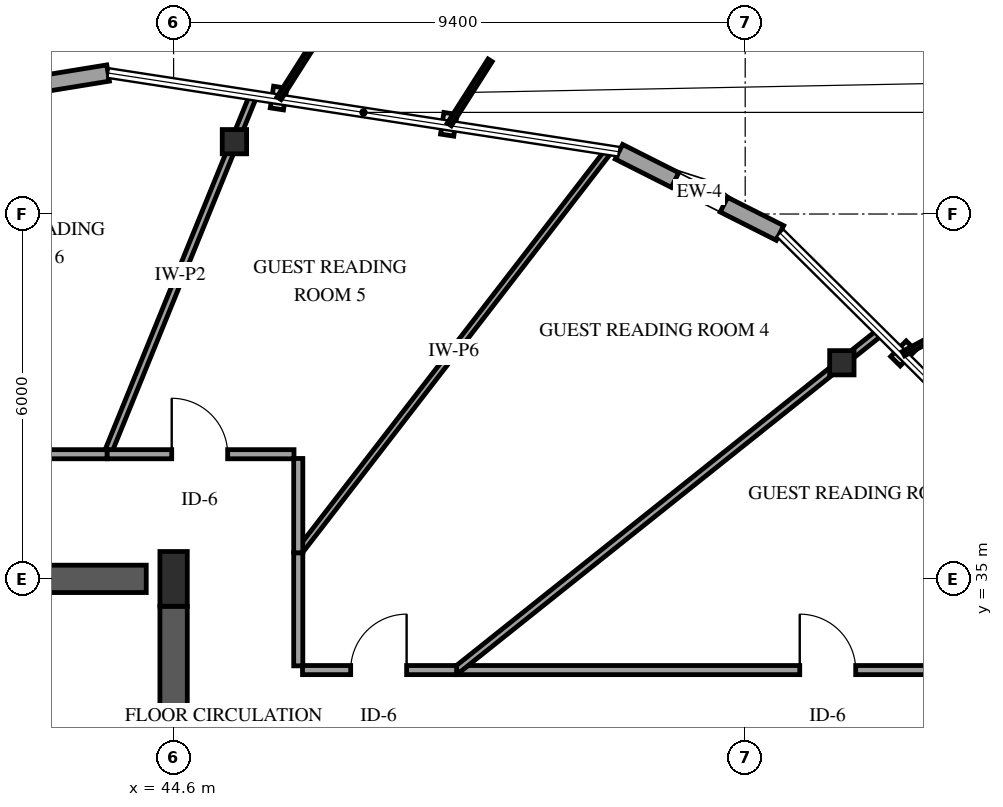
"""IFC4 building model, lengths in metres.
Left out: names, types, materials, properties, quantities, classifications, styles, units other than length and angle.
Written with IfcOpenShell. Run it as: python <this file> out.ifc"""

import sys

from ifc_helpers import new_model, si_unit, direction, frame, frame_2d, origin, origin_2d, place, context, subcontext, project, spatial, rectangle, i_section, extrude, element, fill, save


model = new_model("IFC4")
c1 = context("Model", 3, precision=1e-05, world=origin(), true_north=direction((0.0, 1.0)))
c2 = subcontext(c1, "Body", "Model", "MODEL_VIEW")
j1 = project(units=[si_unit("LENGTHUNIT", "METRE"), si_unit("PLANEANGLEUNIT", "RADIAN")], contexts=[c1])
p1 = place(None, origin())
s1 = spatial("IfcSite", under=j1, at=p1, CompositionType="ELEMENT")
p2 = place(p1, origin())
s2 = spatial("IfcBuilding", under=s1, at=p2, CompositionType="ELEMENT")
p3 = place(p2, frame((0.0, 0.0, 265.0)))
s3 = spatial("IfcBuildingStorey", under=s2, at=p3, CompositionType="ELEMENT", Elevation=265.0)
p4 = place(p3, frame((41.3, 35.0, 0.0), z_axis=(0.0, 0.0, 1.0), x_axis=(1.0, 0.0, 0.0)))
e1 = element("IfcWall", 1, at=p4, inside=s3, PredefinedType="SHEAR", context=c2, shape_type="SweptSolid", body=[
    extrude(rectangle(XDim=2.85, YDim=0.45, at=frame_2d((1.425, 0.0))), origin(), (0.0, 0.0, 1.0), 3.75),
])
p5 = place(p3, frame((44.6, 29.8, 0.0), z_axis=(0.0, 0.0, 1.0), x_axis=(0.0, 1.0, 0.0)))
e2 = element("IfcWall", 2, at=p5, inside=s3, PredefinedType="SHEAR", context=c2, shape_type="SweptSolid", body=[
    extrude(rectangle(XDim=4.75, YDim=0.45, at=frame_2d((2.375, 0.0))), origin(), (0.0, 0.0, 1.0), 3.75),
])
p6 = place(p3, frame((44.6, 35.0, 0.0), z_axis=(0.0, 0.0, 1.0), x_axis=(1.0, 0.0, 0.0)))
e3 = element("IfcColumn", 3, at=p6, inside=s3, PredefinedType="PILASTER", context=c2, shape_type="SweptSolid", body=[
    extrude(rectangle(XDim=0.45, YDim=0.9, at=origin_2d()), origin(), (0.0, 0.0, 1.0), 3.75),
])
for number, where, z_axis, x_axis in (
    (4, (55.589, 38.554, 0.0), (0.0, 0.0, 1.0), (1.0, 0.0, 0.0)),
    (5, (45.6, 42.189, 0.0), (0.0, 0.0, 1.0), (1.0, 0.0, 0.0)),
):
    element("IfcColumn", number, at=place(p3, frame(where, z_axis=z_axis, x_axis=x_axis)), inside=s3, PredefinedType="COLUMN", context=c2, shape_type="SweptSolid", body=[
        extrude(i_section(OverallWidth=0.401, OverallDepth=0.399, WebThickness=0.025, FlangeThickness=0.04, FilletRadius=0.038, at=origin_2d()), origin(), (0.0, 0.0, 1.0), 3.75),
    ])
p7 = place(p3, frame((43.523, 43.319, 0.0), z_axis=(0.0, 0.0, 1.0), x_axis=(-0.98702699036, -0.16055441539, 0.0)))
e6 = element("IfcWall", 6, at=p7, inside=s3, PredefinedType="SOLIDWALL", context=c2, shape_type="SweptSolid", body=[
    extrude(rectangle(XDim=2.967, YDim=0.27, at=frame_2d((1.483, 0.0))), origin(), (0.0, 0.0, 1.0), 2.829),
])
p8 = place(p7, frame((1.033, 0.0, 0.75)))
e7 = element("IfcOpeningElement", 7, at=p8, cuts=e6, PredefinedType="OPENING", context=c2, shape_type="SweptSolid", body=[
    extrude(rectangle(XDim=0.9, YDim=1.5, at=frame_2d((0.45, 0.75))), frame((0.0, 0.145, 0.0), z_axis=(0.0, -1.0, 0.0), x_axis=(1.0, 0.0, 0.0)), (0.0, 0.0, 1.0), 0.29),
])
p9 = place(p3, frame((54.572, 40.688, 0.0), z_axis=(0.0, 0.0, 1.0), x_axis=(-0.892907823858, 0.450239511919, 0.0)))
e8 = element("IfcWall", 8, at=p9, inside=s3, PredefinedType="SOLIDWALL", context=c2, shape_type="SweptSolid", body=[
    extrude(rectangle(XDim=2.967, YDim=0.27, at=frame_2d((1.483, 0.0))), origin(), (0.0, 0.0, 1.0), 2.829),
])
p10 = place(p9, frame((1.033, 0.0, 0.75)))
e9 = element("IfcOpeningElement", 9, at=p10, cuts=e8, PredefinedType="OPENING", context=c2, shape_type="SweptSolid", body=[
    extrude(rectangle(XDim=0.9, YDim=1.5, at=frame_2d((0.45, 0.75))), frame((0.0, 0.145, 0.0), z_axis=(0.0, -1.0, 0.0), x_axis=(1.0, 0.0, 0.0)), (0.0, 0.0, 1.0), 0.29),
])
p11 = place(p3, frame((49.254, 33.5, 0.0), z_axis=(0.0, 0.0, 1.0), x_axis=(1.0, 0.0, 0.0)))
e10 = element("IfcWall", 10, at=p11, inside=s3, PredefinedType="PARTITIONING", context=c2, shape_type="SweptSolid", body=[
    extrude(rectangle(XDim=12.236, YDim=0.15, at=frame_2d((6.118, 0.0))), origin(), (0.0, 0.0, 1.0), 3.45),
])
p12 = place(p11, frame((5.643, 0.0, 0.0)))
e11 = element("IfcOpeningElement", 11, at=p12, cuts=e10, PredefinedType="OPENING", context=c2, shape_type="SweptSolid", body=[
    extrude(rectangle(XDim=0.92, YDim=2.12, at=frame_2d((0.46, 1.06))), frame((0.0, 0.085, 0.0), z_axis=(0.0, -1.0, 0.0), x_axis=(1.0, 0.0, 0.0)), (0.0, 0.0, 1.0), 0.17),
])
p13 = place(p3, frame((49.254, 33.5, 0.0), z_axis=(0.0, 0.0, 1.0), x_axis=(0.781710283579, 0.623641750163, 0.0)))
e12 = element("IfcWall", 12, at=p13, inside=s3, PredefinedType="PARTITIONING", context=c2, shape_type="SweptSolid", body=[
    extrude(rectangle(XDim=8.909, YDim=0.12, at=frame_2d((4.455, 0.0))), origin(), (0.0, 0.0, 1.0), 3.45),
])
p14 = place(p3, frame((46.65, 35.429, 0.0), z_axis=(0.0, 0.0, 1.0), x_axis=(0.611113468405, 0.791543004981, 0.0)))
e13 = element("IfcWall", 13, at=p14, inside=s3, PredefinedType="PARTITIONING", context=c2, shape_type="SweptSolid", body=[
    extrude(rectangle(XDim=8.364, YDim=0.11, at=frame_2d((4.182, 0.0))), origin(), (0.0, 0.0, 1.0), 2.828),
])
p15 = place(p3, frame((43.508, 37.05, 0.0), z_axis=(0.0, 0.0, 1.0), x_axis=(0.377131345073, 0.926159785654, 0.0)))
e14 = element("IfcWall", 14, at=p15, inside=s3, PredefinedType="PARTITIONING", context=c2, shape_type="SweptSolid", body=[
    extrude(rectangle(XDim=6.371, YDim=0.12, at=frame_2d((3.186, 0.0))), origin(), (0.0, 0.0, 1.0), 2.745),
])
p16 = place(p3, frame((39.373, 37.05, 0.0), z_axis=(0.0, 0.0, 1.0), x_axis=(1.0, 0.0, 0.0)))
e15 = element("IfcWall", 15, at=p16, inside=s3, PredefinedType="PARTITIONING", context=c2, shape_type="SweptSolid", body=[
    extrude(rectangle(XDim=4.135, YDim=0.15, at=frame_2d((2.067, 0.0))), origin(), (0.0, 0.0, 1.0), 3.45),
])
p17 = place(p16, frame((1.593, 0.0, 0.0)))
e16 = element("IfcOpeningElement", 16, at=p17, cuts=e15, PredefinedType="OPENING", context=c2, shape_type="SweptSolid", body=[
    extrude(rectangle(XDim=0.92, YDim=2.12, at=frame_2d((0.46, 1.06))), frame((0.0, 0.085, 0.0), z_axis=(0.0, -1.0, 0.0), x_axis=(1.0, 0.0, 0.0)), (0.0, 0.0, 1.0), 0.17),
])
p18 = place(p3, frame((43.508, 37.05, 0.0), z_axis=(0.0, 0.0, 1.0), x_axis=(1.0, 0.0, 0.0)))
e17 = element("IfcWall", 17, at=p18, inside=s3, PredefinedType="PARTITIONING", context=c2, shape_type="SweptSolid", body=[
    extrude(rectangle(XDim=3.072, YDim=0.15, at=frame_2d((1.536, 0.0))), origin(), (0.0, 0.0, 1.0), 3.45),
])
p19 = place(p18, frame((1.061, 0.0, 0.0)))
e18 = element("IfcOpeningElement", 18, at=p19, cuts=e17, PredefinedType="OPENING", context=c2, shape_type="SweptSolid", body=[
    extrude(rectangle(XDim=0.92, YDim=2.12, at=frame_2d((0.46, 1.06))), frame((0.0, 0.085, 0.0), z_axis=(0.0, -1.0, 0.0), x_axis=(1.0, 0.0, 0.0)), (0.0, 0.0, 1.0), 0.17),
])
p20 = place(p3, frame((46.72, 33.5, 0.0), z_axis=(0.0, 0.0, 1.0), x_axis=(1.0, 0.0, 0.0)))
e19 = element("IfcWall", 19, at=p20, inside=s3, PredefinedType="PARTITIONING", context=c2, shape_type="SweptSolid", body=[
    extrude(rectangle(XDim=2.534, YDim=0.15, at=frame_2d((1.267, 0.0))), origin(), (0.0, 0.0, 1.0), 3.45),
])
p21 = place(p20, frame((0.792, 0.0, 0.0)))
e20 = element("IfcOpeningElement", 20, at=p21, cuts=e19, PredefinedType="OPENING", context=c2, shape_type="SweptSolid", body=[
    extrude(rectangle(XDim=0.92, YDim=2.12, at=frame_2d((0.46, 1.06))), frame((0.0, 0.085, 0.0), z_axis=(0.0, -1.0, 0.0), x_axis=(1.0, 0.0, 0.0)), (0.0, 0.0, 1.0), 0.17),
])
p22 = place(p3, frame((46.65, 35.429, 0.0), z_axis=(0.0, 0.0, 1.0), x_axis=(0.0, -1.0, 0.0)))
e21 = element("IfcWall", 21, at=p22, inside=s3, PredefinedType="PARTITIONING", context=c2, shape_type="SweptSolid", body=[
    extrude(rectangle(XDim=1.859, YDim=0.15, at=frame_2d((0.929, 0.0))), origin(), (0.0, 0.0, 1.0), 3.45),
])
p23 = place(p3, frame((46.65, 36.98, 0.0), z_axis=(0.0, 0.0, 1.0), x_axis=(0.0, -1.0, 0.0)))
e22 = element("IfcWall", 22, at=p23, inside=s3, PredefinedType="PARTITIONING", context=c2, shape_type="SweptSolid", body=[
    extrude(rectangle(XDim=1.551, YDim=0.15, at=frame_2d((0.775, 0.0))), origin(), (0.0, 0.0, 1.0), 3.45),
])
p24 = place(p10, origin())
e23 = element("IfcWindow", 23, at=p24, inside=s3, PartitioningType="SINGLE_PANEL", PredefinedType="WINDOW", context=c2, shape_type="SweptSolid", body=[
    extrude(rectangle(XDim=0.9, YDim=1.5, at=frame_2d((0.45, 0.75))), frame((0.0, 0.03, 0.0), z_axis=(0.0, -1.0, 0.0), x_axis=(1.0, 0.0, 0.0)), (0.0, 0.0, 1.0), 0.06),
])
fill(e9, e23)
p25 = place(p12, origin())
e24 = element("IfcDoor", 24, at=p25, inside=s3, OperationType="SINGLE_SWING_LEFT", PredefinedType="DOOR", context=c2, shape_type="SweptSolid", body=[
    extrude(rectangle(XDim=0.92, YDim=2.12, at=frame_2d((0.46, 1.06))), frame((0.0, 0.025, 0.0), z_axis=(0.0, -1.0, 0.0), x_axis=(1.0, 0.0, 0.0)), (0.0, 0.0, 1.0), 0.05),
])
fill(e11, e24)
p26 = place(p19, origin())
e25 = element("IfcDoor", 25, at=p26, inside=s3, OperationType="SINGLE_SWING_LEFT", PredefinedType="DOOR", context=c2, shape_type="SweptSolid", body=[
    extrude(rectangle(XDim=0.92, YDim=2.12, at=frame_2d((0.46, 1.06))), frame((0.0, 0.025, 0.0), z_axis=(0.0, -1.0, 0.0), x_axis=(1.0, 0.0, 0.0)), (0.0, 0.0, 1.0), 0.05),
])
fill(e18, e25)
p27 = place(p21, origin())
e26 = element("IfcDoor", 26, at=p27, inside=s3, OperationType="SINGLE_SWING_RIGHT", PredefinedType="DOOR", context=c2, shape_type="SweptSolid", body=[
    extrude(rectangle(XDim=0.92, YDim=2.12, at=frame_2d((0.46, 1.06))), frame((0.0, 0.025, 0.0), z_axis=(0.0, -1.0, 0.0), x_axis=(1.0, 0.0, 0.0)), (0.0, 0.0, 1.0), 0.05),
])
fill(e20, e26)
save(model, sys.argv[1])
